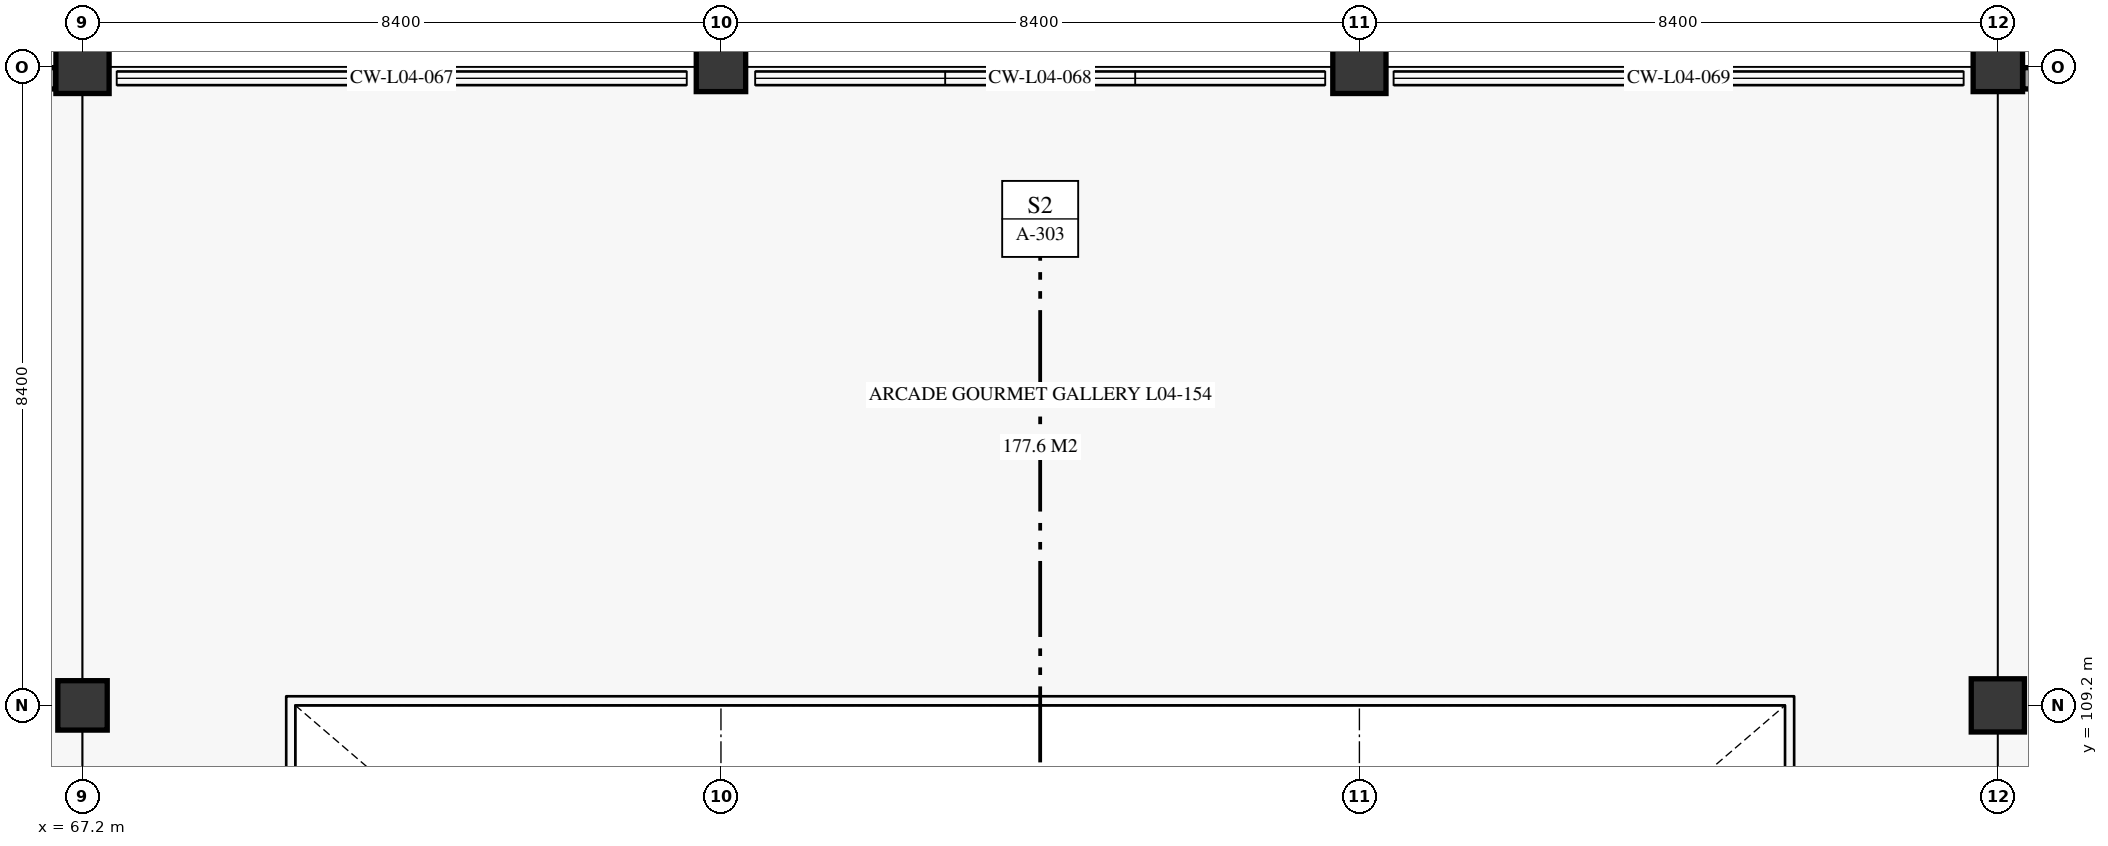
"""IFC4 building model, lengths in metres.
Left out: names, types, materials, properties, quantities, classifications, styles, units other than length and angle.
Written with IfcOpenShell. Run it as: python <this file> out.ifc"""

import sys

from ifc_helpers import new_model, si_unit, direction, frame, frame_2d, origin, origin_2d, place, context, subcontext, project, spatial, rectangle, extrude, element, save


model = new_model("IFC4")
c1 = context("Model", 3, precision=1e-05, world=origin(), true_north=direction((0.0, 1.0)))
c2 = subcontext(c1, "Body", "Model", "MODEL_VIEW")
j1 = project(units=[si_unit("LENGTHUNIT", "METRE"), si_unit("PLANEANGLEUNIT", "RADIAN")], contexts=[c1])
p1 = place(None, origin())
s1 = spatial("IfcSite", under=j1, at=p1, CompositionType="ELEMENT")
p2 = place(p1, origin())
s2 = spatial("IfcBuilding", under=s1, at=p2, CompositionType="ELEMENT")
p3 = place(p2, frame((0.0, 0.0, 16.8)))
s3 = spatial("IfcBuildingStorey", under=s2, at=p3, CompositionType="ELEMENT", Elevation=16.8)
p4 = place(p3, frame((67.2, 109.2, 0.0), z_axis=(0.0, 0.0, 1.0), x_axis=(1.0, 0.0, 0.0)))
e1 = element("IfcColumn", 1, at=p4, inside=s3, PredefinedType="COLUMN", context=c2, shape_type="SweptSolid", body=[
    extrude(rectangle(XDim=0.65, YDim=0.65, at=origin_2d()), origin(), (0.0, 0.0, 1.0), 5.1),
])
p5 = place(p3, frame((67.2, 117.6, 0.0), z_axis=(0.0, 0.0, 1.0), x_axis=(1.0, 0.0, 0.0)))
e2 = element("IfcColumn", 2, at=p5, inside=s3, PredefinedType="COLUMN", context=c2, shape_type="SweptSolid", body=[
    extrude(rectangle(XDim=0.7, YDim=0.7, at=origin_2d()), origin(), (0.0, 0.0, 1.0), 5.1),
])
p6 = place(p3, frame((75.6, 117.6, 0.0), z_axis=(0.0, 0.0, 1.0), x_axis=(1.0, 0.0, 0.0)))
e3 = element("IfcColumn", 3, at=p6, inside=s3, PredefinedType="COLUMN", context=c2, shape_type="SweptSolid", body=[
    extrude(rectangle(XDim=0.65, YDim=0.65, at=origin_2d()), origin(), (0.0, 0.0, 1.0), 5.1),
])
for number, where, z_axis, x_axis in (
    (4, (84.0, 117.6, 0.0), (0.0, 0.0, 1.0), (1.0, 0.0, 0.0)),
    (5, (92.4, 109.2, 0.0), (0.0, 0.0, 1.0), (1.0, 0.0, 0.0)),
):
    element("IfcColumn", number, at=place(p3, frame(where, z_axis=z_axis, x_axis=x_axis)), inside=s3, PredefinedType="COLUMN", context=c2, shape_type="SweptSolid", body=[
        extrude(rectangle(XDim=0.7, YDim=0.7, at=origin_2d()), origin(), (0.0, 0.0, 1.0), 5.1),
    ])
p7 = place(p3, frame((92.4, 117.6, 0.0), z_axis=(0.0, 0.0, 1.0), x_axis=(1.0, 0.0, 0.0)))
e6 = element("IfcColumn", 6, at=p7, inside=s3, PredefinedType="COLUMN", context=c2, shape_type="SweptSolid", body=[
    extrude(rectangle(XDim=0.65, YDim=0.65, at=origin_2d()), origin(), (0.0, 0.0, 1.0), 5.1),
])
p8 = place(p3, frame((59.128, 117.45, 0.0), z_axis=(0.0, 0.0, 1.0), x_axis=(1.0, 0.0, 0.0)))
e7 = element("IfcWall", 7, at=p8, inside=s3, PredefinedType="SOLIDWALL", context=c2, shape_type="SweptSolid", body=[
    extrude(rectangle(XDim=7.72, YDim=0.28, at=frame_2d((3.86, 0.0))), origin(), (0.0, 0.0, 1.0), 4.38),
])
p9 = place(p8, frame((2.222, 0.0, 0.95)))
e8 = element("IfcOpeningElement", 8, at=p9, cuts=e7, PredefinedType="OPENING", context=c2, shape_type="SweptSolid", body=[
    extrude(rectangle(XDim=3.3, YDim=2.3, at=frame_2d((1.65, 1.15))), frame((0.0, 0.15, 0.0), z_axis=(0.0, -1.0, 0.0), x_axis=(1.0, 0.0, 0.0)), (0.0, 0.0, 1.0), 0.3),
])
p10 = place(p3, frame((92.728, 117.45, 0.0), z_axis=(0.0, 0.0, 1.0), x_axis=(1.0, 0.0, 0.0)))
e9 = element("IfcWall", 9, at=p10, inside=s3, PredefinedType="SOLIDWALL", context=c2, shape_type="SweptSolid", body=[
    extrude(rectangle(XDim=7.72, YDim=0.28, at=frame_2d((3.86, 0.0))), origin(), (0.0, 0.0, 1.0), 4.38),
])
p11 = place(p10, frame((2.822, 0.0, 0.95)))
e10 = element("IfcOpeningElement", 10, at=p11, cuts=e9, PredefinedType="OPENING", context=c2, shape_type="SweptSolid", body=[
    extrude(rectangle(XDim=2.1, YDim=2.1, at=frame_2d((1.05, 1.05))), frame((0.0, 0.15, 0.0), z_axis=(0.0, -1.0, 0.0), x_axis=(1.0, 0.0, 0.0)), (0.0, 0.0, 1.0), 0.3),
])
save(model, sys.argv[1])
